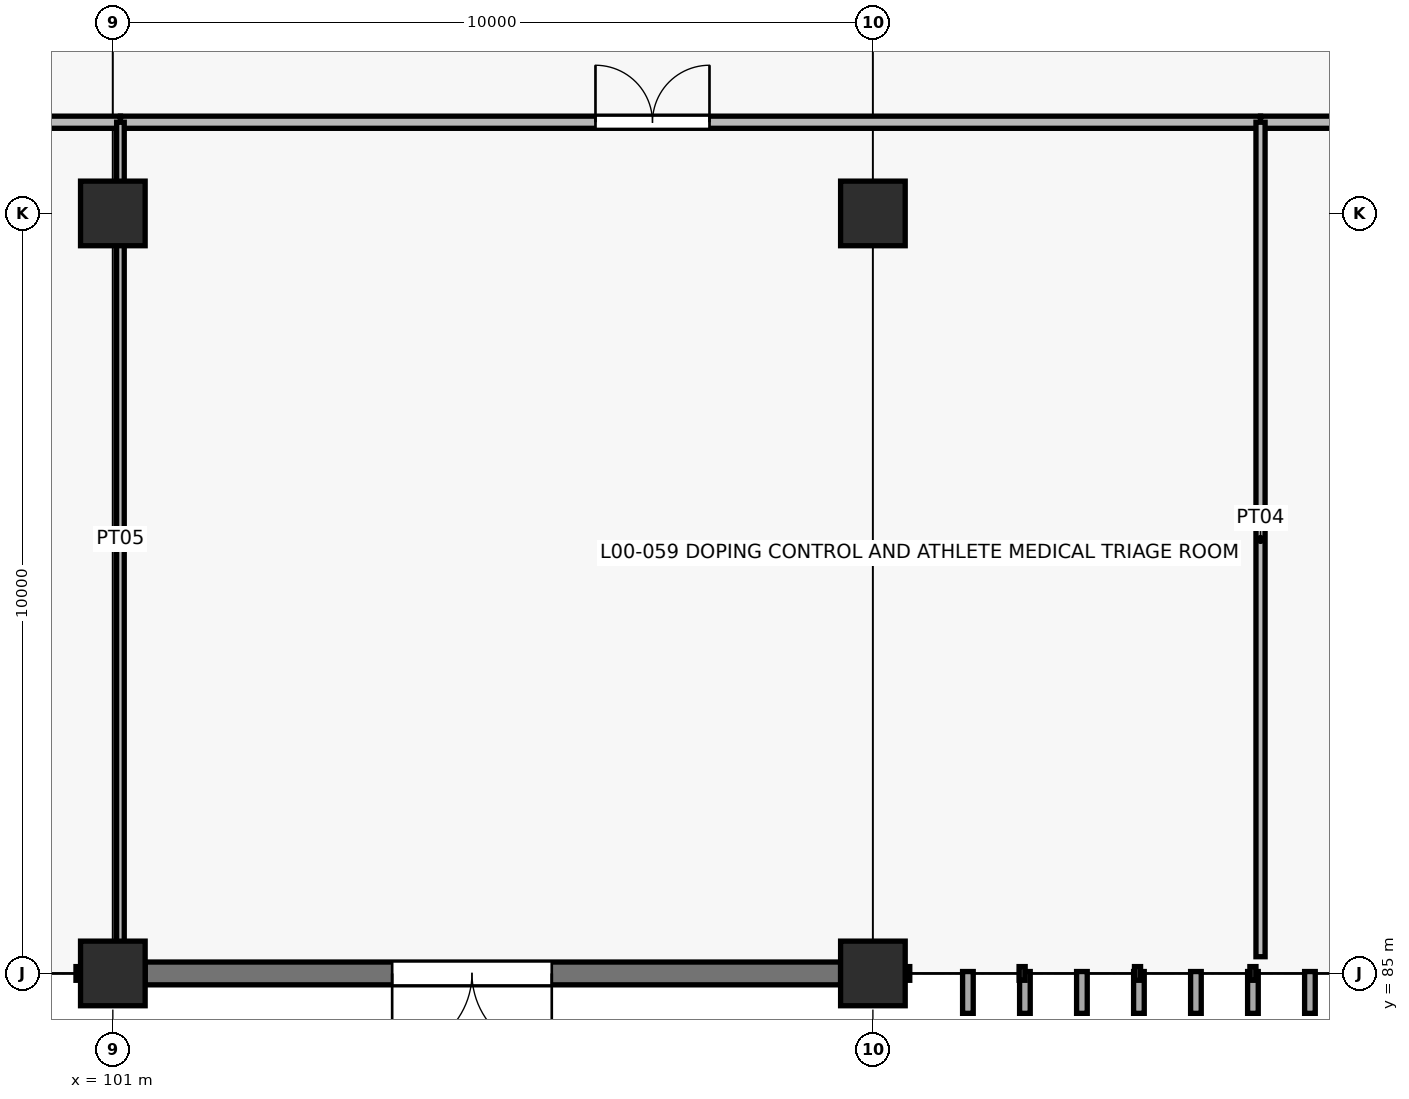
"""IFC4 building model, lengths in metres.
Left out: names, types, materials, properties, quantities, classifications, styles, units other than length and angle.
Written with IfcOpenShell. Run it as: python <this file> out.ifc"""

import sys

from ifc_helpers import new_model, si_unit, direction, frame, frame_2d, origin, origin_2d, place, context, subcontext, project, spatial, rectangle, extrude, element, fill, save


model = new_model("IFC4")
c1 = context("Model", 3, precision=1e-05, world=origin(), true_north=direction((0.0, 1.0)))
c2 = subcontext(c1, "Body", "Model", "MODEL_VIEW")
j1 = project(units=[si_unit("LENGTHUNIT", "METRE"), si_unit("PLANEANGLEUNIT", "RADIAN")], contexts=[c1])
p1 = place(None, origin())
s1 = spatial("IfcSite", under=j1, at=p1, CompositionType="ELEMENT")
p2 = place(p1, origin())
s2 = spatial("IfcBuilding", under=s1, at=p2, CompositionType="ELEMENT")
p3 = place(p2, origin())
s3 = spatial("IfcBuildingStorey", under=s2, at=p3, CompositionType="ELEMENT", Elevation=0.0)
for number, where, z_axis, x_axis in (
    (1, (101.0, 85.0, 0.0), (0.0, 0.0, 1.0), (1.0, 0.0, 0.0)),
    (2, (101.0, 95.0, 0.0), (0.0, 0.0, 1.0), (1.0, 0.0, 0.0)),
    (3, (111.0, 85.0, 0.0), (0.0, 0.0, 1.0), (1.0, 0.0, 0.0)),
    (4, (111.0, 95.0, 0.0), (0.0, 0.0, 1.0), (1.0, 0.0, 0.0)),
):
    element("IfcColumn", number, at=place(p3, frame(where, z_axis=z_axis, x_axis=x_axis)), inside=s3, PredefinedType="COLUMN", context=c2, shape_type="SweptSolid", body=[
        extrude(rectangle(XDim=0.85, YDim=0.85, at=origin_2d()), origin(), (0.0, 0.0, 1.0), 4.8),
    ])
p4 = place(p3, frame((110.575, 85.0, 0.0), z_axis=(0.0, 0.0, 1.0), x_axis=(-1.0, 0.0, 0.0)))
e5 = element("IfcWall", 5, at=p4, inside=s3, PredefinedType="SOLIDWALL", context=c2, shape_type="SweptSolid", body=[
    extrude(rectangle(XDim=9.15, YDim=0.3, at=frame_2d((4.575, 0.0))), origin(), (0.0, 0.0, 1.0), 4.8),
])
p5 = place(p4, frame((3.8, 0.0, 0.0)))
e6 = element("IfcOpeningElement", 6, at=p5, cuts=e5, PredefinedType="OPENING", context=c2, shape_type="SweptSolid", body=[
    extrude(rectangle(XDim=2.1, YDim=2.35, at=frame_2d((1.05, 1.175))), frame((0.0, 0.16, 0.0), z_axis=(0.0, -1.0, 0.0), x_axis=(1.0, 0.0, 0.0)), (0.0, 0.0, 1.0), 0.32),
])
p6 = place(p3, frame((87.3, 96.2, 0.0), z_axis=(0.0, 0.0, 1.0), x_axis=(1.0, 0.0, 0.0)))
e7 = element("IfcWall", 7, at=p6, inside=s3, PredefinedType="PARTITIONING", context=c2, shape_type="SweptSolid", body=[
    extrude(rectangle(XDim=13.8, YDim=0.16, at=frame_2d((6.9, 0.0))), origin(), (0.0, 0.0, 1.0), 3.525),
])
p7 = place(p6, frame((6.2, 0.0, 0.0)))
e8 = element("IfcOpeningElement", 8, at=p7, cuts=e7, PredefinedType="OPENING", context=c2, shape_type="SweptSolid", body=[
    extrude(rectangle(XDim=1.4, YDim=2.2, at=frame_2d((0.7, 1.1))), frame((0.0, 0.09, 0.0), z_axis=(0.0, -1.0, 0.0), x_axis=(1.0, 0.0, 0.0)), (0.0, 0.0, 1.0), 0.18),
])
p8 = place(p3, frame((101.1, 96.2, 0.0), z_axis=(0.0, 0.0, 1.0), x_axis=(1.0, 0.0, 0.0)))
e9 = element("IfcWall", 9, at=p8, inside=s3, PredefinedType="PARTITIONING", context=c2, shape_type="SweptSolid", body=[
    extrude(rectangle(XDim=15.0, YDim=0.16, at=frame_2d((7.5, 0.0))), origin(), (0.0, 0.0, 1.0), 3.525),
])
p9 = place(p8, frame((6.25, 0.0, 0.0)))
e10 = element("IfcOpeningElement", 10, at=p9, cuts=e9, PredefinedType="OPENING", context=c2, shape_type="SweptSolid", body=[
    extrude(rectangle(XDim=1.5, YDim=2.2, at=frame_2d((0.75, 1.1))), frame((0.0, 0.09, 0.0), z_axis=(0.0, -1.0, 0.0), x_axis=(1.0, 0.0, 0.0)), (0.0, 0.0, 1.0), 0.18),
])
p10 = place(p3, frame((101.1, 85.22, 0.0), z_axis=(0.0, 0.0, 1.0), x_axis=(0.0, 1.0, 0.0)))
e11 = element("IfcWall", 11, at=p10, inside=s3, PredefinedType="PARTITIONING", context=c2, shape_type="SweptSolid", body=[
    extrude(rectangle(XDim=10.98, YDim=0.1, at=frame_2d((5.49, 0.0))), origin(), (0.0, 0.0, 1.0), 3.525),
])
p11 = place(p3, frame((116.1, 96.2, 0.0), z_axis=(0.0, 0.0, 1.0), x_axis=(1.0, 0.0, 0.0)))
e12 = element("IfcWall", 12, at=p11, inside=s3, PredefinedType="PARTITIONING", context=c2, shape_type="SweptSolid", body=[
    extrude(rectangle(XDim=5.0, YDim=0.16, at=frame_2d((2.5, 0.0))), origin(), (0.0, 0.0, 1.0), 3.525),
])
p12 = place(p11, frame((2.0, 0.0, 0.0)))
e13 = element("IfcOpeningElement", 13, at=p12, cuts=e12, PredefinedType="OPENING", context=c2, shape_type="SweptSolid", body=[
    extrude(rectangle(XDim=0.98, YDim=2.1, at=frame_2d((0.49, 1.05))), frame((0.0, 0.09, 0.0), z_axis=(0.0, -1.0, 0.0), x_axis=(1.0, 0.0, 0.0)), (0.0, 0.0, 1.0), 0.18),
])
p13 = place(p3, frame((116.1, 85.22, 0.0), z_axis=(0.0, 0.0, 1.0), x_axis=(0.0, 1.0, 0.0)))
e14 = element("IfcWall", 14, at=p13, inside=s3, PredefinedType="PARTITIONING", context=c2, shape_type="SweptSolid", body=[
    extrude(rectangle(XDim=10.98, YDim=0.12, at=frame_2d((5.49, 0.0))), origin(), (0.0, 0.0, 1.0), 3.625),
])
p14 = place(p5, origin())
e15 = element("IfcDoor", 15, at=p14, inside=s3, OperationType="DOUBLE_DOOR_SINGLE_SWING", PredefinedType="DOOR", context=c2, shape_type="SweptSolid", body=[
    extrude(rectangle(XDim=2.1, YDim=2.35, at=frame_2d((1.05, 1.175))), frame((0.0, 0.025, 0.0), z_axis=(0.0, -1.0, 0.0), x_axis=(1.0, 0.0, 0.0)), (0.0, 0.0, 1.0), 0.05),
])
fill(e6, e15)
p15 = place(p9, origin())
e16 = element("IfcDoor", 16, at=p15, inside=s3, OperationType="DOUBLE_DOOR_SINGLE_SWING", PredefinedType="DOOR", context=c2, shape_type="SweptSolid", body=[
    extrude(rectangle(XDim=1.5, YDim=2.2, at=frame_2d((0.75, 1.1))), frame((0.0, 0.025, 0.0), z_axis=(0.0, -1.0, 0.0), x_axis=(1.0, 0.0, 0.0)), (0.0, 0.0, 1.0), 0.05),
])
fill(e10, e16)
save(model, sys.argv[1])
